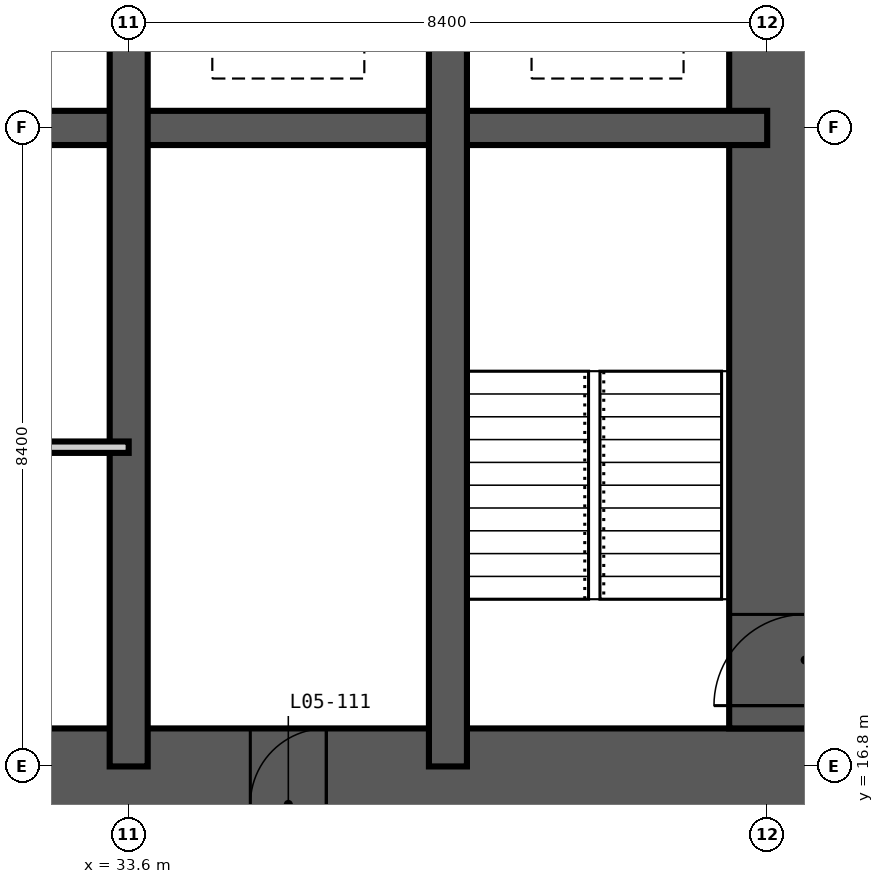
"""IFC4 building model, lengths in metres.
Left out: names, types, materials, properties, quantities, classifications, styles, units other than length and angle.
Written with IfcOpenShell. Run it as: python <this file> out.ifc"""

import sys

from ifc_helpers import new_model, si_unit, direction, frame, frame_2d, origin, place, context, subcontext, project, spatial, rectangle, extrude, element, fill, save


model = new_model("IFC4")
c1 = context("Model", 3, precision=1e-05, world=origin(), true_north=direction((0.0, 1.0)))
c2 = subcontext(c1, "Body", "Model", "MODEL_VIEW")
j1 = project(units=[si_unit("LENGTHUNIT", "METRE"), si_unit("PLANEANGLEUNIT", "RADIAN")], contexts=[c1])
p1 = place(None, origin())
s1 = spatial("IfcSite", under=j1, at=p1, CompositionType="ELEMENT")
p2 = place(p1, origin())
s2 = spatial("IfcBuilding", under=s1, at=p2, CompositionType="ELEMENT")
p3 = place(p2, frame((0.0, 0.0, 27.0)))
s3 = spatial("IfcBuildingStorey", under=s2, at=p3, CompositionType="ELEMENT", Elevation=27.0)
p4 = place(p3, frame((15.3, 16.3, -0.35), z_axis=(0.0, 0.0, 1.0), x_axis=(1.0, 0.0, 0.0)))
e1 = element("IfcWall", 1, at=p4, inside=s3, PredefinedType="SHEAR", context=c2, shape_type="SweptSolid", body=[
    extrude(rectangle(XDim=28.2, YDim=2.0, at=frame_2d((14.1, 0.0))), origin(), (0.0, 0.0, 1.0), 3.6),
])
p5 = place(p4, frame((13.6, 0.0, 0.35)))
e2 = element("IfcOpeningElement", 2, at=p5, cuts=e1, PredefinedType="OPENING", context=c2, shape_type="SweptSolid", body=[
    extrude(rectangle(XDim=1.0, YDim=2.1, at=frame_2d((0.5, 1.05))), frame((0.0, 1.01, 0.0), z_axis=(0.0, -1.0, 0.0), x_axis=(1.0, 0.0, 0.0)), (0.0, 0.0, 1.0), 2.02),
])
p6 = place(p4, frame((19.9, 0.0, 0.35)))
e3 = element("IfcOpeningElement", 3, at=p6, cuts=e1, PredefinedType="OPENING", context=c2, shape_type="SweptSolid", body=[
    extrude(rectangle(XDim=1.0, YDim=2.1, at=frame_2d((0.5, 1.05))), frame((0.0, 1.01, 0.0), z_axis=(0.0, -1.0, 0.0), x_axis=(1.0, 0.0, 0.0)), (0.0, 0.0, 1.0), 2.02),
])
p7 = place(p3, frame((42.5, 17.3, -0.35), z_axis=(0.0, 0.0, 1.0), x_axis=(0.0, 1.0, 0.0)))
e4 = element("IfcWall", 4, at=p7, inside=s3, PredefinedType="SHEAR", context=c2, shape_type="SweptSolid", body=[
    extrude(rectangle(XDim=24.2, YDim=2.0, at=frame_2d((12.1, 0.0))), origin(), (0.0, 0.0, 1.0), 3.6),
])
p8 = place(p7, frame((0.3, 0.0, 0.35)))
e5 = element("IfcOpeningElement", 5, at=p8, cuts=e4, PredefinedType="OPENING", context=c2, shape_type="SweptSolid", body=[
    extrude(rectangle(XDim=1.2, YDim=2.2, at=frame_2d((0.6, 1.1))), frame((0.0, 1.01, 0.0), z_axis=(0.0, -1.0, 0.0), x_axis=(1.0, 0.0, 0.0)), (0.0, 0.0, 1.0), 2.02),
])
p9 = place(p7, frame((11.6, 0.0, 0.35)))
e6 = element("IfcOpeningElement", 6, at=p9, cuts=e4, PredefinedType="OPENING", context=c2, shape_type="SweptSolid", body=[
    extrude(rectangle(XDim=1.0, YDim=2.1, at=frame_2d((0.5, 1.05))), frame((0.0, 1.01, 0.0), z_axis=(0.0, -1.0, 0.0), x_axis=(1.0, 0.0, 0.0)), (0.0, 0.0, 1.0), 2.02),
])
p10 = place(p7, frame((20.0, 0.0, 0.35)))
e7 = element("IfcOpeningElement", 7, at=p10, cuts=e4, PredefinedType="OPENING", context=c2, shape_type="SweptSolid", body=[
    extrude(rectangle(XDim=1.0, YDim=2.1, at=frame_2d((0.5, 1.05))), frame((0.0, 1.01, 0.0), z_axis=(0.0, -1.0, 0.0), x_axis=(1.0, 0.0, 0.0)), (0.0, 0.0, 1.0), 2.02),
])
p11 = place(p3, frame((16.8, 25.2, -0.35), z_axis=(0.0, 0.0, 1.0), x_axis=(1.0, 0.0, 0.0)))
e8 = element("IfcWall", 8, at=p11, inside=s3, PredefinedType="SHEAR", context=c2, shape_type="SweptSolid", body=[
    extrude(rectangle(XDim=25.2, YDim=0.45, at=frame_2d((12.6, 0.0))), origin(), (0.0, 0.0, 1.0), 3.6),
])
p12 = place(p3, frame((33.6, 16.8, -0.35), z_axis=(0.0, 0.0, 1.0), x_axis=(0.0, 1.0, 0.0)))
e9 = element("IfcWall", 9, at=p12, inside=s3, PredefinedType="SHEAR", context=c2, shape_type="SweptSolid", body=[
    extrude(rectangle(XDim=25.2, YDim=0.5, at=frame_2d((12.6, 0.0))), origin(), (0.0, 0.0, 1.0), 3.6),
])
p13 = place(p12, frame((22.5, 0.0, 0.35)))
e10 = element("IfcOpeningElement", 10, at=p13, cuts=e9, PredefinedType="OPENING", context=c2, shape_type="SweptSolid", body=[
    extrude(rectangle(XDim=1.2, YDim=2.2, at=frame_2d((0.6, 1.1))), frame((0.0, 0.26, 0.0), z_axis=(0.0, -1.0, 0.0), x_axis=(1.0, 0.0, 0.0)), (0.0, 0.0, 1.0), 0.52),
])
p14 = place(p12, frame((18.3, 0.0, 0.35)))
e11 = element("IfcOpeningElement", 11, at=p14, cuts=e9, PredefinedType="OPENING", context=c2, shape_type="SweptSolid", body=[
    extrude(rectangle(XDim=1.2, YDim=2.2, at=frame_2d((0.6, 1.1))), frame((0.0, 0.26, 0.0), z_axis=(0.0, -1.0, 0.0), x_axis=(1.0, 0.0, 0.0)), (0.0, 0.0, 1.0), 0.52),
])
p15 = place(p12, frame((12.1, 0.0, 0.35)))
e12 = element("IfcOpeningElement", 12, at=p15, cuts=e9, PredefinedType="OPENING", context=c2, shape_type="SweptSolid", body=[
    extrude(rectangle(XDim=1.0, YDim=2.1, at=frame_2d((0.5, 1.05))), frame((0.0, 0.26, 0.0), z_axis=(0.0, -1.0, 0.0), x_axis=(1.0, 0.0, 0.0)), (0.0, 0.0, 1.0), 0.52),
])
p16 = place(p3, frame((37.8, 16.8, -0.35), z_axis=(0.0, 0.0, 1.0), x_axis=(0.0, 1.0, 0.0)))
e13 = element("IfcWall", 13, at=p16, inside=s3, PredefinedType="SHEAR", context=c2, shape_type="SweptSolid", body=[
    extrude(rectangle(XDim=11.2, YDim=0.5, at=frame_2d((5.6, 0.0))), origin(), (0.0, 0.0, 1.0), 3.6),
])
p17 = place(p3, frame((25.2, 21.0, 0.0), z_axis=(0.0, 0.0, 1.0), x_axis=(1.0, 0.0, 0.0)))
e14 = element("IfcWall", 14, at=p17, inside=s3, PredefinedType="PARTITIONING", context=c2, shape_type="SweptSolid", body=[
    extrude(rectangle(XDim=8.4, YDim=0.15, at=frame_2d((4.2, 0.0))), origin(), (0.0, 0.0, 1.0), 3.25),
])
p18 = place(p17, frame((3.7, 0.0, 0.0)))
e15 = element("IfcOpeningElement", 15, at=p18, cuts=e14, PredefinedType="OPENING", context=c2, shape_type="SweptSolid", body=[
    extrude(rectangle(XDim=1.0, YDim=2.1, at=frame_2d((0.5, 1.05))), frame((0.0, 0.085, 0.0), z_axis=(0.0, -1.0, 0.0), x_axis=(1.0, 0.0, 0.0)), (0.0, 0.0, 1.0), 0.17),
])
p19 = place(p8, origin())
e16 = element("IfcDoor", 16, at=p19, inside=s3, OperationType="SINGLE_SWING_LEFT", PredefinedType="DOOR", context=c2, shape_type="SweptSolid", body=[
    extrude(rectangle(XDim=1.2, YDim=2.2, at=frame_2d((0.6, 1.1))), frame((0.0, 0.025, 0.0), z_axis=(0.0, -1.0, 0.0), x_axis=(1.0, 0.0, 0.0)), (0.0, 0.0, 1.0), 0.05),
])
fill(e5, e16)
p20 = place(p6, origin())
e17 = element("IfcDoor", 17, at=p20, inside=s3, OperationType="SINGLE_SWING_RIGHT", PredefinedType="DOOR", context=c2, shape_type="SweptSolid", body=[
    extrude(rectangle(XDim=1.0, YDim=2.1, at=frame_2d((0.5, 1.05))), frame((0.0, 0.025, 0.0), z_axis=(0.0, -1.0, 0.0), x_axis=(1.0, 0.0, 0.0)), (0.0, 0.0, 1.0), 0.05),
])
fill(e3, e17)
save(model, sys.argv[1])
